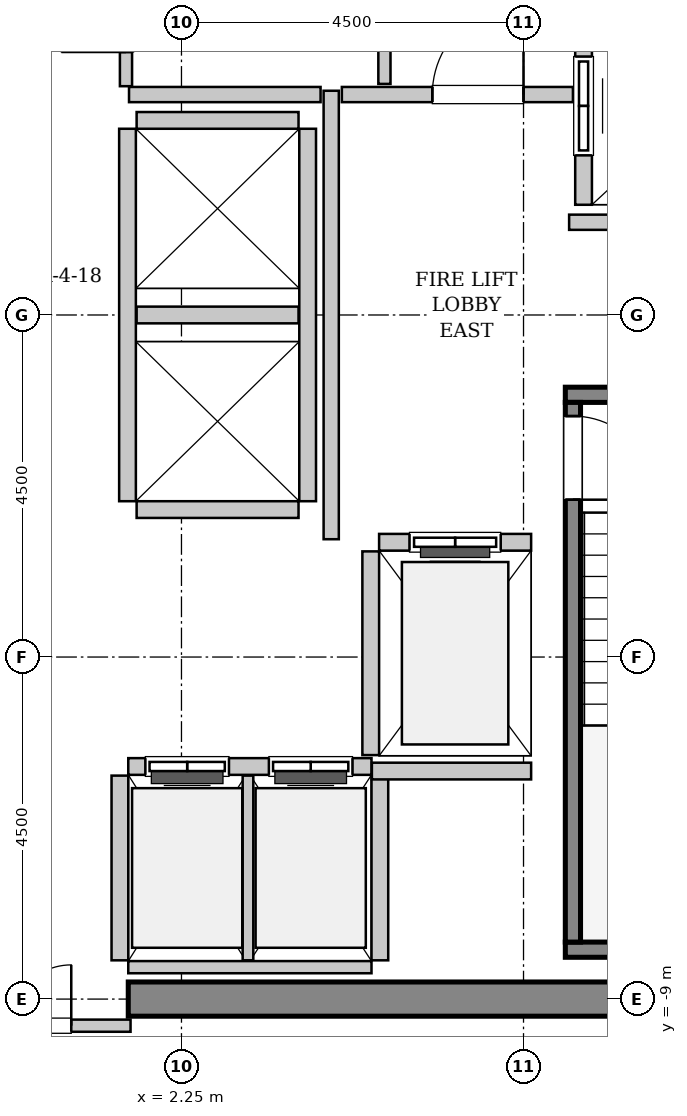
"""IFC4 building model, lengths in metres.
Left out: names, types, materials, properties, quantities, classifications, styles, units other than length and angle.
Written with IfcOpenShell. Run it as: python <this file> out.ifc"""

import sys

from ifc_helpers import new_model, si_unit, direction, frame, frame_2d, origin, place, context, subcontext, project, spatial, rectangle, extrude, source, transform, mapped, element, fill, save


model = new_model("IFC4")
c1 = context("Model", 3, precision=1e-05, world=origin(), true_north=direction((0.0, 1.0)))
c2 = subcontext(c1, "Body", "Model", "MODEL_VIEW")
j1 = project(units=[si_unit("LENGTHUNIT", "METRE"), si_unit("PLANEANGLEUNIT", "RADIAN")], contexts=[c1])
p1 = place(None, origin())
s1 = spatial("IfcSite", under=j1, at=p1, CompositionType="ELEMENT")
p2 = place(p1, origin())
s2 = spatial("IfcBuilding", under=s1, at=p2, CompositionType="ELEMENT")
p3 = place(p2, frame((0.0, 0.0, 237.0)))
s3 = spatial("IfcBuildingStorey", under=s2, at=p3, CompositionType="ELEMENT", Elevation=237.0)
m1 = source(origin(), c2, "Body", "SweptSolid", [
    extrude(rectangle(XDim=9.925, YDim=0.45, at=frame_2d((4.962, 0.0))), origin(), (0.0, 0.0, 1.0), 3.8),
])
p4 = place(p3, frame((1.55, -9.0, 0.0), z_axis=(0.0, 0.0, 1.0), x_axis=(1.0, 0.0, 0.0)))
e1 = element("IfcWall", 1, at=p4, inside=s3, PredefinedType="SHEAR", context=c2, shape_type="MappedRepresentation", body=[
    mapped(m1, transform((0.0, 0.0, 0.0), x_axis=(1.0, 0.0, 0.0), y_axis=(0.0, 1.0, 0.0), z_axis=(0.0, 0.0, 1.0), scale=1.0)),
])
m2 = source(origin(), c2, "Body", "SweptSolid", [
    extrude(rectangle(XDim=3.4, YDim=0.2, at=frame_2d((1.7, 0.0))), origin(), (0.0, 0.0, 1.0), 3.8),
])
p5 = place(p3, frame((7.3, -1.05, 0.0), z_axis=(0.0, 0.0, 1.0), x_axis=(1.0, 0.0, 0.0)))
e2 = element("IfcWall", 2, at=p5, inside=s3, PredefinedType="SOLIDWALL", context=c2, shape_type="MappedRepresentation", body=[
    mapped(m2, transform((0.0, 0.0, 0.0), x_axis=(1.0, 0.0, 0.0), y_axis=(0.0, 1.0, 0.0), z_axis=(0.0, 0.0, 1.0), scale=1.0)),
])
m3 = source(origin(), c2, "Body", "SweptSolid", [
    extrude(rectangle(XDim=3.73, YDim=0.2, at=frame_2d((1.865, 0.0))), origin(), (0.0, 0.0, 1.0), 3.8),
])
p6 = place(p3, frame((7.3, -8.35, 0.0), z_axis=(0.0, 0.0, 1.0), x_axis=(1.0, 0.0, 0.0)))
e3 = element("IfcWall", 3, at=p6, inside=s3, PredefinedType="SOLIDWALL", context=c2, shape_type="MappedRepresentation", body=[
    mapped(m3, transform((0.0, 0.0, 0.0), x_axis=(1.0, 0.0, 0.0), y_axis=(0.0, 1.0, 0.0), z_axis=(0.0, 0.0, 1.0), scale=1.0)),
])
m4 = source(origin(), c2, "Body", "SweptSolid", [
    extrude(rectangle(XDim=7.1, YDim=0.2, at=frame_2d((3.55, 0.0))), origin(), (0.0, 0.0, 1.0), 3.8),
])
p7 = place(p3, frame((7.4, -1.15, 0.0), z_axis=(0.0, 0.0, 1.0), x_axis=(0.0, -1.0, 0.0)))
e4 = element("IfcWall", 4, at=p7, inside=s3, PredefinedType="SOLIDWALL", context=c2, shape_type="MappedRepresentation", body=[
    mapped(m4, transform((0.0, 0.0, 0.0), x_axis=(1.0, 0.0, 0.0), y_axis=(0.0, 1.0, 0.0), z_axis=(0.0, 0.0, 1.0), scale=1.0)),
])
p8 = place(p7, frame((0.18, 0.0, 0.0)))
e5 = element("IfcOpeningElement", 5, at=p8, cuts=e4, PredefinedType="OPENING", context=c2, shape_type="SweptSolid", body=[
    extrude(rectangle(XDim=1.1, YDim=2.15, at=frame_2d((0.55, 1.075))), frame((0.0, 0.11, 0.0), z_axis=(0.0, -1.0, 0.0), x_axis=(1.0, 0.0, 0.0)), (0.0, 0.0, 1.0), 0.22),
])
m5 = source(origin(), c2, "Body", "SweptSolid", [
    extrude(rectangle(XDim=2.0, YDim=0.22, at=frame_2d((1.0, 0.0))), origin(), (0.0, 0.0, 1.0), 3.535),
])
p9 = place(p3, frame((6.85, -2.99, 0.0), z_axis=(0.0, 0.0, 1.0), x_axis=(-1.0, 0.0, 0.0)))
e6 = element("IfcWall", 6, at=p9, inside=s3, PredefinedType="SOLIDWALL", context=c2, shape_type="MappedRepresentation", body=[
    mapped(m5, transform((0.0, 0.0, 0.0), x_axis=(1.0, 0.0, 0.0), y_axis=(0.0, 1.0, 0.0), z_axis=(0.0, 0.0, 1.0), scale=1.0)),
])
p10 = place(p9, frame((0.4, 0.0, 0.0)))
e7 = element("IfcOpeningElement", 7, at=p10, cuts=e6, PredefinedType="OPENING", context=c2, shape_type="SweptSolid", body=[
    extrude(rectangle(XDim=1.2, YDim=2.2, at=frame_2d((0.6, 1.1))), frame((0.0, 0.12, 0.0), z_axis=(0.0, -1.0, 0.0), x_axis=(1.0, 0.0, 0.0)), (0.0, 0.0, 1.0), 0.24),
])
m6 = source(origin(), c2, "Body", "SweptSolid", [
    extrude(rectangle(XDim=2.68, YDim=0.22, at=frame_2d((1.34, 0.0))), origin(), (0.0, 0.0, 1.0), 3.535),
])
p11 = place(p3, frame((4.74, -3.11, 0.0), z_axis=(0.0, 0.0, 1.0), x_axis=(0.0, -1.0, 0.0)))
e8 = element("IfcWall", 8, at=p11, inside=s3, PredefinedType="SOLIDWALL", context=c2, shape_type="MappedRepresentation", body=[
    mapped(m6, transform((0.0, 0.0, 0.0), x_axis=(1.0, 0.0, 0.0), y_axis=(0.0, 1.0, 0.0), z_axis=(0.0, 0.0, 1.0), scale=1.0)),
])
m7 = source(origin(), c2, "Body", "SweptSolid", [
    extrude(rectangle(XDim=5.45, YDim=0.22, at=frame_2d((2.725, 0.0))), origin(), (0.0, 0.0, 1.0), 3.535),
])
p12 = place(p3, frame((7.54, 6.9, 0.0), z_axis=(0.0, 0.0, 1.0), x_axis=(0.0, -1.0, 0.0)))
e9 = element("IfcWall", 9, at=p12, inside=s3, PredefinedType="SOLIDWALL", context=c2, shape_type="MappedRepresentation", body=[
    mapped(m7, transform((0.0, 0.0, 0.0), x_axis=(1.0, 0.0, 0.0), y_axis=(0.0, 1.0, 0.0), z_axis=(0.0, 0.0, 1.0), scale=1.0)),
])
p13 = place(p12, frame((3.5, 0.0, 0.0)))
e10 = element("IfcOpeningElement", 10, at=p13, cuts=e9, PredefinedType="OPENING", context=c2, shape_type="SweptSolid", body=[
    extrude(rectangle(XDim=1.3, YDim=2.3, at=frame_2d((0.65, 1.15))), frame((0.0, 0.12, 0.0), z_axis=(0.0, -1.0, 0.0), x_axis=(1.0, 0.0, 0.0)), (0.0, 0.0, 1.0), 0.24),
])
p14 = place(p12, frame((0.65, 0.0, 0.0)))
e11 = element("IfcOpeningElement", 11, at=p14, cuts=e9, PredefinedType="OPENING", context=c2, shape_type="SweptSolid", body=[
    extrude(rectangle(XDim=1.3, YDim=2.3, at=frame_2d((0.65, 1.15))), frame((0.0, 0.12, 0.0), z_axis=(0.0, -1.0, 0.0), x_axis=(1.0, 0.0, 0.0)), (0.0, 0.0, 1.0), 0.24),
])
m8 = source(origin(), c2, "Body", "SweptSolid", [
    extrude(rectangle(XDim=3.2, YDim=0.22, at=frame_2d((1.6, 0.0))), origin(), (0.0, 0.0, 1.0), 3.535),
])
p15 = place(p3, frame((4.75, -5.94, 0.0), z_axis=(0.0, 0.0, 1.0), x_axis=(-1.0, 0.0, 0.0)))
e12 = element("IfcWall", 12, at=p15, inside=s3, PredefinedType="SOLIDWALL", context=c2, shape_type="MappedRepresentation", body=[
    mapped(m8, transform((0.0, 0.0, 0.0), x_axis=(1.0, 0.0, 0.0), y_axis=(0.0, 1.0, 0.0), z_axis=(0.0, 0.0, 1.0), scale=1.0)),
])
p16 = place(p15, frame((1.875, 0.0, 0.0)))
e13 = element("IfcOpeningElement", 13, at=p16, cuts=e12, PredefinedType="OPENING", context=c2, shape_type="SweptSolid", body=[
    extrude(rectangle(XDim=1.1, YDim=2.2, at=frame_2d((0.55, 1.1))), frame((0.0, 0.12, 0.0), z_axis=(0.0, -1.0, 0.0), x_axis=(1.0, 0.0, 0.0)), (0.0, 0.0, 1.0), 0.24),
])
p17 = place(p15, frame((0.25, 0.0, 0.0)))
e14 = element("IfcOpeningElement", 14, at=p17, cuts=e12, PredefinedType="OPENING", context=c2, shape_type="SweptSolid", body=[
    extrude(rectangle(XDim=1.1, YDim=2.2, at=frame_2d((0.55, 1.1))), frame((0.0, 0.12, 0.0), z_axis=(0.0, -1.0, 0.0), x_axis=(1.0, 0.0, 0.0)), (0.0, 0.0, 1.0), 0.24),
])
m9 = source(origin(), c2, "Body", "SweptSolid", [
    extrude(rectangle(XDim=3.2, YDim=0.16, at=frame_2d((1.6, 0.0))), origin(), (0.0, 0.0, 1.0), 2.625),
])
p18 = place(p3, frame((1.55, -8.58, 0.0), z_axis=(0.0, 0.0, 1.0), x_axis=(1.0, 0.0, 0.0)))
e15 = element("IfcWall", 15, at=p18, inside=s3, PredefinedType="PARTITIONING", context=c2, shape_type="MappedRepresentation", body=[
    mapped(m9, transform((0.0, 0.0, 0.0), x_axis=(1.0, 0.0, 0.0), y_axis=(0.0, 1.0, 0.0), z_axis=(0.0, 0.0, 1.0), scale=1.0)),
])
m10 = source(origin(), c2, "Body", "SweptSolid", [
    extrude(rectangle(XDim=2.43, YDim=0.22, at=frame_2d((1.215, 0.0))), origin(), (0.0, 0.0, 1.0), 3.535),
])
p19 = place(p3, frame((1.44, -6.06, 0.0), z_axis=(0.0, 0.0, 1.0), x_axis=(0.0, -1.0, 0.0)))
e16 = element("IfcWall", 16, at=p19, inside=s3, PredefinedType="SOLIDWALL", context=c2, shape_type="MappedRepresentation", body=[
    mapped(m10, transform((0.0, 0.0, 0.0), x_axis=(1.0, 0.0, 0.0), y_axis=(0.0, 1.0, 0.0), z_axis=(0.0, 0.0, 1.0), scale=1.0)),
])
m11 = source(origin(), c2, "Body", "SweptSolid", [
    extrude(rectangle(XDim=2.43, YDim=0.14, at=frame_2d((1.215, 0.0))), origin(), (0.0, 0.0, 1.0), 3.535),
])
p20 = place(p3, frame((3.125, -8.49, 0.0), z_axis=(0.0, 0.0, 1.0), x_axis=(0.0, 1.0, 0.0)))
e17 = element("IfcWall", 17, at=p20, inside=s3, PredefinedType="PARTITIONING", context=c2, shape_type="MappedRepresentation", body=[
    mapped(m11, transform((0.0, 0.0, 0.0), x_axis=(1.0, 0.0, 0.0), y_axis=(0.0, 1.0, 0.0), z_axis=(0.0, 0.0, 1.0), scale=1.0)),
])
p21 = place(p3, frame((4.86, -8.49, 0.0), z_axis=(0.0, 0.0, 1.0), x_axis=(0.0, 1.0, 0.0)))
e18 = element("IfcWall", 18, at=p21, inside=s3, PredefinedType="SOLIDWALL", context=c2, shape_type="MappedRepresentation", body=[
    mapped(m10, transform((0.0, 0.0, 0.0), x_axis=(1.0, 0.0, 0.0), y_axis=(0.0, 1.0, 0.0), z_axis=(0.0, 0.0, 1.0), scale=1.0)),
])
m12 = source(origin(), c2, "Body", "SweptSolid", [
    extrude(rectangle(XDim=4.9, YDim=0.22, at=frame_2d((2.45, 0.0))), origin(), (0.0, 0.0, 1.0), 3.535),
])
for number, where, z_axis, x_axis in (
    (19, (1.54, 2.45, 0.0), (0.0, 0.0, 1.0), (0.0, -1.0, 0.0)),
    (20, (3.91, -2.45, 0.0), (0.0, 0.0, 1.0), (0.0, 1.0, 0.0)),
):
    element("IfcWall", number, at=place(p3, frame(where, z_axis=z_axis, x_axis=x_axis)), inside=s3, PredefinedType="SOLIDWALL", context=c2, shape_type="MappedRepresentation", body=[
        mapped(m12, transform((0.0, 0.0, 0.0), x_axis=(1.0, 0.0, 0.0), y_axis=(0.0, 1.0, 0.0), z_axis=(0.0, 0.0, 1.0), scale=1.0)),
    ])
m13 = source(origin(), c2, "Body", "SweptSolid", [
    extrude(rectangle(XDim=2.13, YDim=0.22, at=frame_2d((1.065, 0.0))), origin(), (0.0, 0.0, 1.0), 3.535),
])
for number, where, z_axis, x_axis in (
    (21, (1.66, -2.56, 0.0), (0.0, 0.0, 1.0), (1.0, 0.0, 0.0)),
    (22, (1.66, 0.0, 0.0), (0.0, 0.0, 1.0), (1.0, 0.0, 0.0)),
    (23, (3.79, 2.56, 0.0), (0.0, 0.0, 1.0), (-1.0, 0.0, 0.0)),
):
    element("IfcWall", number, at=place(p3, frame(where, z_axis=z_axis, x_axis=x_axis)), inside=s3, PredefinedType="SOLIDWALL", context=c2, shape_type="MappedRepresentation", body=[
        mapped(m13, transform((0.0, 0.0, 0.0), x_axis=(1.0, 0.0, 0.0), y_axis=(0.0, 1.0, 0.0), z_axis=(0.0, 0.0, 1.0), scale=1.0)),
    ])
m14 = source(origin(), c2, "Body", "SweptSolid", [
    extrude(rectangle(XDim=2.095, YDim=0.22, at=frame_2d((1.048, 0.0))), origin(), (0.0, 0.0, 1.0), 3.535),
])
p22 = place(p3, frame((4.755, -6.0, 0.0), z_axis=(0.0, 0.0, 1.0), x_axis=(1.0, 0.0, 0.0)))
e24 = element("IfcWall", 24, at=p22, inside=s3, PredefinedType="SOLIDWALL", context=c2, shape_type="MappedRepresentation", body=[
    mapped(m14, transform((0.0, 0.0, 0.0), x_axis=(1.0, 0.0, 0.0), y_axis=(0.0, 1.0, 0.0), z_axis=(0.0, 0.0, 1.0), scale=1.0)),
])
m15 = source(origin(), c2, "Body", "SweptSolid", [
    extrude(rectangle(XDim=5.9, YDim=0.2, at=frame_2d((2.95, 0.0))), origin(), (0.0, 0.0, 1.0), 3.535),
])
p23 = place(p3, frame((4.22, -2.95, 0.0), z_axis=(0.0, 0.0, 1.0), x_axis=(0.0, 1.0, 0.0)))
e25 = element("IfcWall", 25, at=p23, inside=s3, PredefinedType="PARTITIONING", context=c2, shape_type="MappedRepresentation", body=[
    mapped(m15, transform((0.0, 0.0, 0.0), x_axis=(1.0, 0.0, 0.0), y_axis=(0.0, 1.0, 0.0), z_axis=(0.0, 0.0, 1.0), scale=1.0)),
])
m16 = source(origin(), c2, "Body", "SweptSolid", [
    extrude(rectangle(XDim=2.52, YDim=0.2, at=frame_2d((1.26, 0.0))), origin(), (0.0, 0.0, 1.0), 3.535),
])
p24 = place(p3, frame((1.56, 2.9, 0.0), z_axis=(0.0, 0.0, 1.0), x_axis=(1.0, 0.0, 0.0)))
e26 = element("IfcWall", 26, at=p24, inside=s3, PredefinedType="PARTITIONING", context=c2, shape_type="MappedRepresentation", body=[
    mapped(m16, transform((0.0, 0.0, 0.0), x_axis=(1.0, 0.0, 0.0), y_axis=(0.0, 1.0, 0.0), z_axis=(0.0, 0.0, 1.0), scale=1.0)),
])
m17 = source(origin(), c2, "Body", "SweptSolid", [
    extrude(rectangle(XDim=3.04, YDim=0.2, at=frame_2d((1.52, 0.0))), origin(), (0.0, 0.0, 1.0), 3.535),
])
p25 = place(p3, frame((4.36, 2.9, 0.0), z_axis=(0.0, 0.0, 1.0), x_axis=(1.0, 0.0, 0.0)))
e27 = element("IfcWall", 27, at=p25, inside=s3, PredefinedType="PARTITIONING", context=c2, shape_type="MappedRepresentation", body=[
    mapped(m17, transform((0.0, 0.0, 0.0), x_axis=(1.0, 0.0, 0.0), y_axis=(0.0, 1.0, 0.0), z_axis=(0.0, 0.0, 1.0), scale=1.0)),
])
p26 = place(p25, frame((1.19, 0.0, 0.0)))
e28 = element("IfcOpeningElement", 28, at=p26, cuts=e27, PredefinedType="OPENING", context=c2, shape_type="SweptSolid", body=[
    extrude(rectangle(XDim=1.2, YDim=2.15, at=frame_2d((0.6, 1.075))), frame((0.0, 0.11, 0.0), z_axis=(0.0, -1.0, 0.0), x_axis=(1.0, 0.0, 0.0)), (0.0, 0.0, 1.0), 0.22),
])
m18 = source(origin(), c2, "Body", "SweptSolid", [
    extrude(rectangle(XDim=4.11, YDim=0.2, at=frame_2d((2.055, 0.0))), origin(), (0.0, 0.0, 1.0), 3.535),
])
p27 = place(p3, frame((7.35, 1.22, 0.0), z_axis=(0.0, 0.0, 1.0), x_axis=(1.0, 0.0, 0.0)))
e29 = element("IfcWall", 29, at=p27, inside=s3, PredefinedType="PARTITIONING", context=c2, shape_type="MappedRepresentation", body=[
    mapped(m18, transform((0.0, 0.0, 0.0), x_axis=(1.0, 0.0, 0.0), y_axis=(0.0, 1.0, 0.0), z_axis=(0.0, 0.0, 1.0), scale=1.0)),
])
m19 = source(origin(), c2, "Body", "SweptSolid", [
    extrude(rectangle(XDim=3.16, YDim=0.16, at=frame_2d((1.58, 0.0))), origin(), (0.0, 0.0, 1.0), 2.625),
])
p28 = place(p3, frame((-1.58, -9.35, 0.0), z_axis=(0.0, 0.0, 1.0), x_axis=(1.0, 0.0, 0.0)))
e30 = element("IfcWall", 30, at=p28, inside=s3, PredefinedType="PARTITIONING", context=c2, shape_type="MappedRepresentation", body=[
    mapped(m19, transform((0.0, 0.0, 0.0), x_axis=(1.0, 0.0, 0.0), y_axis=(0.0, 1.0, 0.0), z_axis=(0.0, 0.0, 1.0), scale=1.0)),
])
p29 = place(p28, frame((0.78, 0.0, 0.0)))
e31 = element("IfcOpeningElement", 31, at=p29, cuts=e30, PredefinedType="OPENING", context=c2, shape_type="SweptSolid", body=[
    extrude(rectangle(XDim=1.6, YDim=2.3, at=frame_2d((0.8, 1.15))), frame((0.0, 0.09, 0.0), z_axis=(0.0, -1.0, 0.0), x_axis=(1.0, 0.0, 0.0)), (0.0, 0.0, 1.0), 0.18),
])
m20 = source(origin(), c2, "Body", "SweptSolid", [
    extrude(rectangle(XDim=5.45, YDim=0.16, at=frame_2d((2.725, 0.0))), origin(), (0.0, 0.0, 1.0), 3.535),
])
p30 = place(p3, frame((4.92, 3.04, 0.0), z_axis=(0.0, 0.0, 1.0), x_axis=(0.0, 1.0, 0.0)))
e32 = element("IfcWall", 32, at=p30, inside=s3, PredefinedType="PARTITIONING", context=c2, shape_type="MappedRepresentation", body=[
    mapped(m20, transform((0.0, 0.0, 0.0), x_axis=(1.0, 0.0, 0.0), y_axis=(0.0, 1.0, 0.0), z_axis=(0.0, 0.0, 1.0), scale=1.0)),
])
m21 = source(origin(), c2, "Body", "SweptSolid", [
    extrude(rectangle(XDim=1.75, YDim=0.16, at=frame_2d((0.875, 0.0))), origin(), (0.0, 0.0, 1.0), 3.535),
])
p31 = place(p3, frame((1.52, 3.01, 0.0), z_axis=(0.0, 0.0, 1.0), x_axis=(0.0, 1.0, 0.0)))
e33 = element("IfcWall", 33, at=p31, inside=s3, PredefinedType="PARTITIONING", context=c2, shape_type="MappedRepresentation", body=[
    mapped(m21, transform((0.0, 0.0, 0.0), x_axis=(1.0, 0.0, 0.0), y_axis=(0.0, 1.0, 0.0), z_axis=(0.0, 0.0, 1.0), scale=1.0)),
])
p32 = place(p31, frame((0.45, 0.0, 0.0)))
e34 = element("IfcOpeningElement", 34, at=p32, cuts=e33, PredefinedType="OPENING", context=c2, shape_type="SweptSolid", body=[
    extrude(rectangle(XDim=0.85, YDim=2.1, at=frame_2d((0.425, 1.05))), frame((0.0, 0.09, 0.0), z_axis=(0.0, -1.0, 0.0), x_axis=(1.0, 0.0, 0.0)), (0.0, 0.0, 1.0), 0.18),
])
m22 = source(origin(), c2, "Body", "SweptSolid", [
    extrude(rectangle(XDim=1.1, YDim=2.15, at=frame_2d((0.55, 1.075))), frame((0.0, 0.025, 0.0), z_axis=(0.0, -1.0, 0.0), x_axis=(1.0, 0.0, 0.0)), (0.0, 0.0, 1.0), 0.05),
])
p33 = place(p8, origin())
e35 = element("IfcDoor", 35, at=p33, inside=s3, OperationType="SINGLE_SWING_RIGHT", PredefinedType="DOOR", context=c2, shape_type="MappedRepresentation", body=[
    mapped(m22, transform((0.0, 0.0, 0.0), x_axis=(1.0, 0.0, 0.0), y_axis=(0.0, 1.0, 0.0), z_axis=(0.0, 0.0, 1.0), scale=1.0)),
])
fill(e5, e35)
m23 = source(origin(), c2, "Body", "SweptSolid", [
    extrude(rectangle(XDim=1.2, YDim=2.2, at=frame_2d((0.6, 1.1))), frame((0.0, 0.025, 0.0), z_axis=(0.0, -1.0, 0.0), x_axis=(1.0, 0.0, 0.0)), (0.0, 0.0, 1.0), 0.05),
])
p34 = place(p10, origin())
e36 = element("IfcDoor", 36, at=p34, inside=s3, OperationType="SLIDING_TO_LEFT", PredefinedType="DOOR", context=c2, shape_type="MappedRepresentation", body=[
    mapped(m23, transform((0.0, 0.0, 0.0), x_axis=(1.0, 0.0, 0.0), y_axis=(0.0, 1.0, 0.0), z_axis=(0.0, 0.0, 1.0), scale=1.0)),
])
fill(e7, e36)
m24 = source(origin(), c2, "Body", "SweptSolid", [
    extrude(rectangle(XDim=1.3, YDim=2.3, at=frame_2d((0.65, 1.15))), frame((0.0, 0.025, 0.0), z_axis=(0.0, -1.0, 0.0), x_axis=(1.0, 0.0, 0.0)), (0.0, 0.0, 1.0), 0.05),
])
p35 = place(p13, origin())
e37 = element("IfcDoor", 37, at=p35, inside=s3, OperationType="SLIDING_TO_RIGHT", PredefinedType="DOOR", context=c2, shape_type="MappedRepresentation", body=[
    mapped(m24, transform((0.0, 0.0, 0.0), x_axis=(1.0, 0.0, 0.0), y_axis=(0.0, 1.0, 0.0), z_axis=(0.0, 0.0, 1.0), scale=1.0)),
])
fill(e10, e37)
m25 = source(origin(), c2, "Body", "SweptSolid", [
    extrude(rectangle(XDim=1.1, YDim=2.2, at=frame_2d((0.55, 1.1))), frame((0.0, 0.025, 0.0), z_axis=(0.0, -1.0, 0.0), x_axis=(1.0, 0.0, 0.0)), (0.0, 0.0, 1.0), 0.05),
])
p36 = place(p16, origin())
e38 = element("IfcDoor", 38, at=p36, inside=s3, OperationType="DOUBLE_DOOR_SLIDING", PredefinedType="DOOR", context=c2, shape_type="MappedRepresentation", body=[
    mapped(m25, transform((0.0, 0.0, 0.0), x_axis=(1.0, 0.0, 0.0), y_axis=(0.0, 1.0, 0.0), z_axis=(0.0, 0.0, 1.0), scale=1.0)),
])
fill(e13, e38)
p37 = place(p17, origin())
e39 = element("IfcDoor", 39, at=p37, inside=s3, OperationType="DOUBLE_DOOR_SLIDING", PredefinedType="DOOR", context=c2, shape_type="MappedRepresentation", body=[
    mapped(m25, transform((0.0, 0.0, 0.0), x_axis=(1.0, 0.0, 0.0), y_axis=(0.0, 1.0, 0.0), z_axis=(0.0, 0.0, 1.0), scale=1.0)),
])
fill(e14, e39)
m26 = source(origin(), c2, "Body", "SweptSolid", [
    extrude(rectangle(XDim=1.2, YDim=2.15, at=frame_2d((0.6, 1.075))), frame((0.0, 0.025, 0.0), z_axis=(0.0, -1.0, 0.0), x_axis=(1.0, 0.0, 0.0)), (0.0, 0.0, 1.0), 0.05),
])
p38 = place(p26, origin())
e40 = element("IfcDoor", 40, at=p38, inside=s3, OperationType="SINGLE_SWING_RIGHT", PredefinedType="DOOR", context=c2, shape_type="MappedRepresentation", body=[
    mapped(m26, transform((0.0, 0.0, 0.0), x_axis=(1.0, 0.0, 0.0), y_axis=(0.0, 1.0, 0.0), z_axis=(0.0, 0.0, 1.0), scale=1.0)),
])
fill(e28, e40)
m27 = source(origin(), c2, "Body", "SweptSolid", [
    extrude(rectangle(XDim=1.6, YDim=2.3, at=frame_2d((0.8, 1.15))), frame((0.0, 0.025, 0.0), z_axis=(0.0, -1.0, 0.0), x_axis=(1.0, 0.0, 0.0)), (0.0, 0.0, 1.0), 0.05),
])
p39 = place(p29, origin())
e41 = element("IfcDoor", 41, at=p39, inside=s3, OperationType="DOUBLE_DOOR_SINGLE_SWING", PredefinedType="DOOR", context=c2, shape_type="MappedRepresentation", body=[
    mapped(m27, transform((0.0, 0.0, 0.0), x_axis=(1.0, 0.0, 0.0), y_axis=(0.0, 1.0, 0.0), z_axis=(0.0, 0.0, 1.0), scale=1.0)),
])
fill(e31, e41)
save(model, sys.argv[1])
